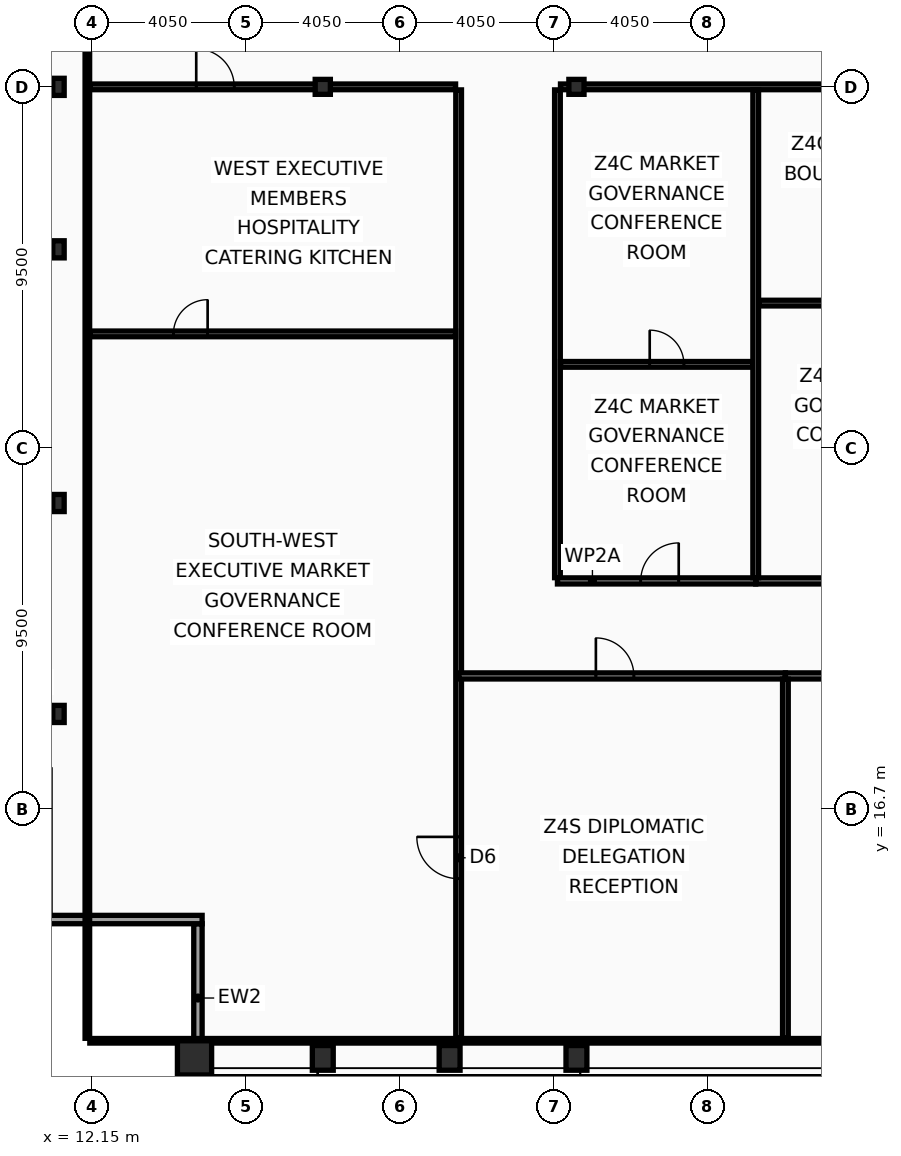
"""IFC4 building model, lengths in metres.
Left out: names, types, materials, properties, quantities, classifications, styles, units other than length and angle.
Written with IfcOpenShell. Run it as: python <this file> out.ifc"""

import sys

from ifc_helpers import new_model, si_unit, direction, frame, frame_2d, origin, origin_2d, place, context, subcontext, project, spatial, rectangle, hollow_rectangle, i_section, extrude, element, fill, save


model = new_model("IFC4")
c1 = context("Model", 3, precision=1e-05, world=origin(), true_north=direction((0.0, 1.0)))
c2 = subcontext(c1, "Body", "Model", "MODEL_VIEW")
j1 = project(units=[si_unit("LENGTHUNIT", "METRE"), si_unit("PLANEANGLEUNIT", "RADIAN")], contexts=[c1])
p1 = place(None, origin())
s1 = spatial("IfcSite", under=j1, at=p1, CompositionType="ELEMENT")
p2 = place(p1, origin())
s2 = spatial("IfcBuilding", under=s1, at=p2, CompositionType="ELEMENT")
p3 = place(p2, frame((0.0, 0.0, 332.6)))
s3 = spatial("IfcBuildingStorey", under=s2, at=p3, CompositionType="ELEMENT", Elevation=332.6)
p4 = place(p3, frame((14.85, 10.15, 0.0), z_axis=(0.0, 0.0, 1.0), x_axis=(1.0, 0.0, 0.0)))
e1 = element("IfcColumn", 1, at=p4, inside=s3, PredefinedType="COLUMN", context=c2, shape_type="SweptSolid", body=[
    extrude(hollow_rectangle(XDim=0.9, YDim=0.9, WallThickness=0.05, at=origin_2d()), origin(), (0.0, 0.0, 1.0), 3.6),
])
for number, where, z_axis, x_axis in (
    (2, (18.225, 10.15, 0.0), (0.0, 0.0, 1.0), (1.0, 0.0, 0.0)),
    (3, (21.562, 10.15, 0.0), (0.0, 0.0, 1.0), (1.0, 0.0, 0.0)),
    (4, (24.9, 10.15, 0.0), (0.0, 0.0, 1.0), (1.0, 0.0, 0.0)),
):
    element("IfcColumn", number, at=place(p3, frame(where, z_axis=z_axis, x_axis=x_axis)), inside=s3, PredefinedType="COLUMN", context=c2, shape_type="SweptSolid", body=[
        extrude(hollow_rectangle(XDim=0.55, YDim=0.65, WallThickness=0.04, at=origin_2d()), origin(), (0.0, 0.0, 1.0), 3.6),
    ])
for number, where, z_axis, x_axis in (
    (5, (11.27, 19.2, 0.0), (0.0, 0.0, 1.0), (1.0, 0.0, 0.0)),
    (6, (11.27, 24.75, 0.0), (0.0, 0.0, 1.0), (1.0, 0.0, 0.0)),
    (7, (11.27, 31.425, 0.0), (0.0, 0.0, 1.0), (1.0, 0.0, 0.0)),
    (8, (11.27, 35.7, 0.0), (0.0, 0.0, 1.0), (1.0, 0.0, 0.0)),
):
    element("IfcColumn", number, at=place(p3, frame(where, z_axis=z_axis, x_axis=x_axis)), inside=s3, PredefinedType="COLUMN", context=c2, shape_type="SweptSolid", body=[
        extrude(i_section(OverallWidth=0.3, OverallDepth=0.45, WebThickness=0.014, FlangeThickness=0.026, at=origin_2d()), origin(), (0.0, 0.0, 1.0), 3.6),
    ])
for number, where, z_axis, x_axis in (
    (9, (18.225, 35.7, 0.0), (0.0, 0.0, 1.0), (1.0, 0.0, 0.0)),
    (10, (24.9, 35.7, 0.0), (0.0, 0.0, 1.0), (1.0, 0.0, 0.0)),
):
    element("IfcColumn", number, at=place(p3, frame(where, z_axis=z_axis, x_axis=x_axis)), inside=s3, PredefinedType="COLUMN", context=c2, shape_type="SweptSolid", body=[
        extrude(i_section(OverallWidth=0.399, OverallDepth=0.393, WebThickness=0.023, FlangeThickness=0.037, at=origin_2d()), origin(), (0.0, 0.0, 1.0), 3.6),
    ])
p5 = place(p3, frame((14.94, 9.77, 0.0), z_axis=(0.0, 0.0, 1.0), x_axis=(0.0, 1.0, 0.0)))
e11 = element("IfcWall", 11, at=p5, inside=s3, PredefinedType="SOLIDWALL", context=c2, shape_type="SweptSolid", body=[
    extrude(rectangle(XDim=3.91, YDim=0.22, at=frame_2d((1.955, 0.0))), origin(), (0.0, 0.0, 1.0), 2.88),
])
p6 = place(p3, frame((15.05, 13.79, 0.0), z_axis=(0.0, 0.0, 1.0), x_axis=(-1.0, 0.0, 0.0)))
e12 = element("IfcWall", 12, at=p6, inside=s3, PredefinedType="SOLIDWALL", context=c2, shape_type="SweptSolid", body=[
    extrude(rectangle(XDim=4.22, YDim=0.22, at=frame_2d((2.11, 0.0))), origin(), (0.0, 0.0, 1.0), 2.88),
])
p7 = place(p3, frame((21.8, 10.665, 0.0), z_axis=(0.0, 0.0, 1.0), x_axis=(0.0, 1.0, 0.0)))
e13 = element("IfcWall", 13, at=p7, inside=s3, PredefinedType="PARTITIONING", context=c2, shape_type="SweptSolid", body=[
    extrude(rectangle(XDim=24.955, YDim=0.15, at=frame_2d((12.478, 0.0))), origin(), (0.0, 0.0, 1.0), 3.07),
])
p8 = place(p7, frame((4.2, 0.0, 0.0)))
e14 = element("IfcOpeningElement", 14, at=p8, cuts=e13, PredefinedType="OPENING", context=c2, shape_type="SweptSolid", body=[
    extrude(rectangle(XDim=1.1, YDim=2.1, at=frame_2d((0.55, 1.05))), frame((0.0, 0.085, 0.0), z_axis=(0.0, -1.0, 0.0), x_axis=(1.0, 0.0, 0.0)), (0.0, 0.0, 1.0), 0.17),
])
p9 = place(p3, frame((12.095, 35.7, 0.0), z_axis=(0.0, 0.0, 1.0), x_axis=(1.0, 0.0, 0.0)))
e15 = element("IfcWall", 15, at=p9, inside=s3, PredefinedType="PARTITIONING", context=c2, shape_type="SweptSolid", body=[
    extrude(rectangle(XDim=9.625, YDim=0.15, at=frame_2d((4.812, 0.0))), origin(), (0.0, 0.0, 1.0), 2.83),
])
p10 = place(p9, frame((2.8, 0.0, 0.0)))
e16 = element("IfcOpeningElement", 16, at=p10, cuts=e15, PredefinedType="OPENING", context=c2, shape_type="SweptSolid", body=[
    extrude(rectangle(XDim=1.0, YDim=2.05, at=frame_2d((0.5, 1.025))), frame((0.0, 0.085, 0.0), z_axis=(0.0, -1.0, 0.0), x_axis=(1.0, 0.0, 0.0)), (0.0, 0.0, 1.0), 0.17),
])
p11 = place(p3, frame((12.095, 29.2, 0.0), z_axis=(0.0, 0.0, 1.0), x_axis=(1.0, 0.0, 0.0)))
e17 = element("IfcWall", 17, at=p11, inside=s3, PredefinedType="PARTITIONING", context=c2, shape_type="SweptSolid", body=[
    extrude(rectangle(XDim=9.625, YDim=0.15, at=frame_2d((4.812, 0.0))), origin(), (0.0, 0.0, 1.0), 2.83),
])
p12 = place(p11, frame((2.2, 0.0, 0.0)))
e18 = element("IfcOpeningElement", 18, at=p12, cuts=e17, PredefinedType="OPENING", context=c2, shape_type="SweptSolid", body=[
    extrude(rectangle(XDim=0.9, YDim=2.05, at=frame_2d((0.45, 1.025))), frame((0.0, 0.085, 0.0), z_axis=(0.0, -1.0, 0.0), x_axis=(1.0, 0.0, 0.0)), (0.0, 0.0, 1.0), 0.17),
])
p13 = place(p3, frame((24.4, 22.785, 0.0), z_axis=(0.0, 0.0, 1.0), x_axis=(0.0, 1.0, 0.0)))
e19 = element("IfcWall", 19, at=p13, inside=s3, PredefinedType="PARTITIONING", context=c2, shape_type="SweptSolid", body=[
    extrude(rectangle(XDim=12.835, YDim=0.15, at=frame_2d((6.417, 0.0))), origin(), (0.0, 0.0, 1.0), 2.83),
])
p14 = place(p3, frame((24.48, 35.7, 0.0), z_axis=(0.0, 0.0, 1.0), x_axis=(1.0, 0.0, 0.0)))
e20 = element("IfcWall", 20, at=p14, inside=s3, PredefinedType="PARTITIONING", context=c2, shape_type="SweptSolid", body=[
    extrude(rectangle(XDim=25.02, YDim=0.15, at=frame_2d((12.51, 0.0))), origin(), (0.0, 0.0, 1.0), 2.83),
])
p15 = place(p3, frame((24.4, 22.7, 0.0), z_axis=(0.0, 0.0, 1.0), x_axis=(1.0, 0.0, 0.0)))
e21 = element("IfcWall", 21, at=p15, inside=s3, PredefinedType="PARTITIONING", context=c2, shape_type="SweptSolid", body=[
    extrude(rectangle(XDim=5.218, YDim=0.16, at=frame_2d((2.609, 0.0))), origin(), (0.0, 0.0, 1.0), 2.83),
])
p16 = place(p15, frame((2.191, 0.0, 0.0)))
e22 = element("IfcOpeningElement", 22, at=p16, cuts=e21, PredefinedType="OPENING", context=c2, shape_type="SweptSolid", body=[
    extrude(rectangle(XDim=1.0, YDim=2.05, at=frame_2d((0.5, 1.025))), frame((0.0, 0.09, 0.0), z_axis=(0.0, -1.0, 0.0), x_axis=(1.0, 0.0, 0.0)), (0.0, 0.0, 1.0), 0.18),
])
p17 = place(p3, frame((24.48, 28.398, 0.0), z_axis=(0.0, 0.0, 1.0), x_axis=(1.0, 0.0, 0.0)))
e23 = element("IfcWall", 23, at=p17, inside=s3, PredefinedType="PARTITIONING", context=c2, shape_type="SweptSolid", body=[
    extrude(rectangle(XDim=5.058, YDim=0.15, at=frame_2d((2.529, 0.0))), origin(), (0.0, 0.0, 1.0), 2.83),
])
p18 = place(p17, frame((2.348, 0.0, 0.0)))
e24 = element("IfcOpeningElement", 24, at=p18, cuts=e23, PredefinedType="OPENING", context=c2, shape_type="SweptSolid", body=[
    extrude(rectangle(XDim=0.9, YDim=2.05, at=frame_2d((0.45, 1.025))), frame((0.0, 0.085, 0.0), z_axis=(0.0, -1.0, 0.0), x_axis=(1.0, 0.0, 0.0)), (0.0, 0.0, 1.0), 0.17),
])
p19 = place(p3, frame((29.618, 22.7, 0.0), z_axis=(0.0, 0.0, 1.0), x_axis=(1.0, 0.0, 0.0)))
e25 = element("IfcWall", 25, at=p19, inside=s3, PredefinedType="PARTITIONING", context=c2, shape_type="SweptSolid", body=[
    extrude(rectangle(XDim=5.598, YDim=0.16, at=frame_2d((2.799, 0.0))), origin(), (0.0, 0.0, 1.0), 3.44),
])
p20 = place(p19, frame((2.351, 0.0, 0.0)))
e26 = element("IfcOpeningElement", 26, at=p20, cuts=e25, PredefinedType="OPENING", context=c2, shape_type="SweptSolid", body=[
    extrude(rectangle(XDim=1.0, YDim=2.05, at=frame_2d((0.5, 1.025))), frame((0.0, 0.09, 0.0), z_axis=(0.0, -1.0, 0.0), x_axis=(1.0, 0.0, 0.0)), (0.0, 0.0, 1.0), 0.18),
])
p21 = place(p3, frame((29.618, 22.785, 0.0), z_axis=(0.0, 0.0, 1.0), x_axis=(0.0, 1.0, 0.0)))
e27 = element("IfcWall", 27, at=p21, inside=s3, PredefinedType="PARTITIONING", context=c2, shape_type="SweptSolid", body=[
    extrude(rectangle(XDim=12.835, YDim=0.15, at=frame_2d((6.417, 0.0))), origin(), (0.0, 0.0, 1.0), 3.07),
])
p22 = place(p3, frame((29.698, 30.01, 0.0), z_axis=(0.0, 0.0, 1.0), x_axis=(1.0, 0.0, 0.0)))
e28 = element("IfcWall", 28, at=p22, inside=s3, PredefinedType="PARTITIONING", context=c2, shape_type="SweptSolid", body=[
    extrude(rectangle(XDim=5.438, YDim=0.15, at=frame_2d((2.719, 0.0))), origin(), (0.0, 0.0, 1.0), 3.07),
])
p23 = place(p22, frame((2.519, 0.0, 0.0)))
e29 = element("IfcOpeningElement", 29, at=p23, cuts=e28, PredefinedType="OPENING", context=c2, shape_type="SweptSolid", body=[
    extrude(rectangle(XDim=0.9, YDim=2.05, at=frame_2d((0.45, 1.025))), frame((0.0, 0.085, 0.0), z_axis=(0.0, -1.0, 0.0), x_axis=(1.0, 0.0, 0.0)), (0.0, 0.0, 1.0), 0.17),
])
p24 = place(p3, frame((21.8, 20.2, 0.0), z_axis=(0.0, 0.0, 1.0), x_axis=(1.0, 0.0, 0.0)))
e30 = element("IfcWall", 30, at=p24, inside=s3, PredefinedType="PARTITIONING", context=c2, shape_type="SweptSolid", body=[
    extrude(rectangle(XDim=8.599, YDim=0.16, at=frame_2d((4.299, 0.0))), origin(), (0.0, 0.0, 1.0), 2.83),
])
p25 = place(p24, frame((3.611, 0.0, 0.0)))
e31 = element("IfcOpeningElement", 31, at=p25, cuts=e30, PredefinedType="OPENING", context=c2, shape_type="SweptSolid", body=[
    extrude(rectangle(XDim=1.0, YDim=2.05, at=frame_2d((0.5, 1.025))), frame((0.0, 0.09, 0.0), z_axis=(0.0, -1.0, 0.0), x_axis=(1.0, 0.0, 0.0)), (0.0, 0.0, 1.0), 0.18),
])
p26 = place(p3, frame((30.399, 20.2, 0.0), z_axis=(0.0, 0.0, 1.0), x_axis=(1.0, 0.0, 0.0)))
e32 = element("IfcWall", 32, at=p26, inside=s3, PredefinedType="PARTITIONING", context=c2, shape_type="SweptSolid", body=[
    extrude(rectangle(XDim=9.26, YDim=0.16, at=frame_2d((4.63, 0.0))), origin(), (0.0, 0.0, 1.0), 3.44),
])
p27 = place(p26, frame((3.889, 0.0, 0.0)))
e33 = element("IfcOpeningElement", 33, at=p27, cuts=e32, PredefinedType="OPENING", context=c2, shape_type="SweptSolid", body=[
    extrude(rectangle(XDim=1.0, YDim=2.05, at=frame_2d((0.5, 1.025))), frame((0.0, 0.09, 0.0), z_axis=(0.0, -1.0, 0.0), x_axis=(1.0, 0.0, 0.0)), (0.0, 0.0, 1.0), 0.18),
])
p28 = place(p3, frame((30.399, 10.665, 0.0), z_axis=(0.0, 0.0, 1.0), x_axis=(0.0, 1.0, 0.0)))
e34 = element("IfcWall", 34, at=p28, inside=s3, PredefinedType="PARTITIONING", context=c2, shape_type="SweptSolid", body=[
    extrude(rectangle(XDim=9.45, YDim=0.15, at=frame_2d((4.725, 0.0))), origin(), (0.0, 0.0, 1.0), 3.07),
])
p29 = place(p3, frame((12.03, 10.665, 0.0), z_axis=(0.0, 0.0, 1.0), x_axis=(0.0, 1.0, 0.0)))
e35 = element("IfcWall", 35, at=p29, inside=s3, PredefinedType="PARTITIONING", context=c2, shape_type="SweptSolid", body=[
    extrude(rectangle(XDim=42.11, YDim=0.12, at=frame_2d((21.055, 0.0))), origin(), (0.0, 0.0, 1.0), 2.83),
])
p30 = place(p3, frame((12.095, 10.6, 0.0), z_axis=(0.0, 0.0, 1.0), x_axis=(1.0, 0.0, 0.0)))
e36 = element("IfcWall", 36, at=p30, inside=s3, PredefinedType="PARTITIONING", context=c2, shape_type="SweptSolid", body=[
    extrude(rectangle(XDim=48.71, YDim=0.12, at=frame_2d((24.355, 0.0))), origin(), (0.0, 0.0, 1.0), 2.83),
])
p31 = place(p8, origin())
e37 = element("IfcDoor", 37, at=p31, inside=s3, OperationType="SINGLE_SWING_RIGHT", PredefinedType="DOOR", context=c2, shape_type="SweptSolid", body=[
    extrude(rectangle(XDim=1.1, YDim=2.1, at=frame_2d((0.55, 1.05))), frame((0.0, 0.025, 0.0), z_axis=(0.0, -1.0, 0.0), x_axis=(1.0, 0.0, 0.0)), (0.0, 0.0, 1.0), 0.05),
])
fill(e14, e37)
p32 = place(p10, origin())
e38 = element("IfcDoor", 38, at=p32, inside=s3, OperationType="SINGLE_SWING_LEFT", PredefinedType="DOOR", context=c2, shape_type="SweptSolid", body=[
    extrude(rectangle(XDim=1.0, YDim=2.05, at=frame_2d((0.5, 1.025))), frame((0.0, 0.025, 0.0), z_axis=(0.0, -1.0, 0.0), x_axis=(1.0, 0.0, 0.0)), (0.0, 0.0, 1.0), 0.05),
])
fill(e16, e38)
p33 = place(p12, origin())
e39 = element("IfcDoor", 39, at=p33, inside=s3, OperationType="SINGLE_SWING_RIGHT", PredefinedType="DOOR", context=c2, shape_type="SweptSolid", body=[
    extrude(rectangle(XDim=0.9, YDim=2.05, at=frame_2d((0.45, 1.025))), frame((0.0, 0.025, 0.0), z_axis=(0.0, -1.0, 0.0), x_axis=(1.0, 0.0, 0.0)), (0.0, 0.0, 1.0), 0.05),
])
fill(e18, e39)
p34 = place(p16, origin())
e40 = element("IfcDoor", 40, at=p34, inside=s3, OperationType="SINGLE_SWING_RIGHT", PredefinedType="DOOR", context=c2, shape_type="SweptSolid", body=[
    extrude(rectangle(XDim=1.0, YDim=2.05, at=frame_2d((0.5, 1.025))), frame((0.0, 0.025, 0.0), z_axis=(0.0, -1.0, 0.0), x_axis=(1.0, 0.0, 0.0)), (0.0, 0.0, 1.0), 0.05),
])
fill(e22, e40)
p35 = place(p18, origin())
e41 = element("IfcDoor", 41, at=p35, inside=s3, OperationType="SINGLE_SWING_LEFT", PredefinedType="DOOR", context=c2, shape_type="SweptSolid", body=[
    extrude(rectangle(XDim=0.9, YDim=2.05, at=frame_2d((0.45, 1.025))), frame((0.0, 0.025, 0.0), z_axis=(0.0, -1.0, 0.0), x_axis=(1.0, 0.0, 0.0)), (0.0, 0.0, 1.0), 0.05),
])
fill(e24, e41)
p36 = place(p25, origin())
e42 = element("IfcDoor", 42, at=p36, inside=s3, OperationType="SINGLE_SWING_LEFT", PredefinedType="DOOR", context=c2, shape_type="SweptSolid", body=[
    extrude(rectangle(XDim=1.0, YDim=2.05, at=frame_2d((0.5, 1.025))), frame((0.0, 0.025, 0.0), z_axis=(0.0, -1.0, 0.0), x_axis=(1.0, 0.0, 0.0)), (0.0, 0.0, 1.0), 0.05),
])
fill(e31, e42)
save(model, sys.argv[1])
